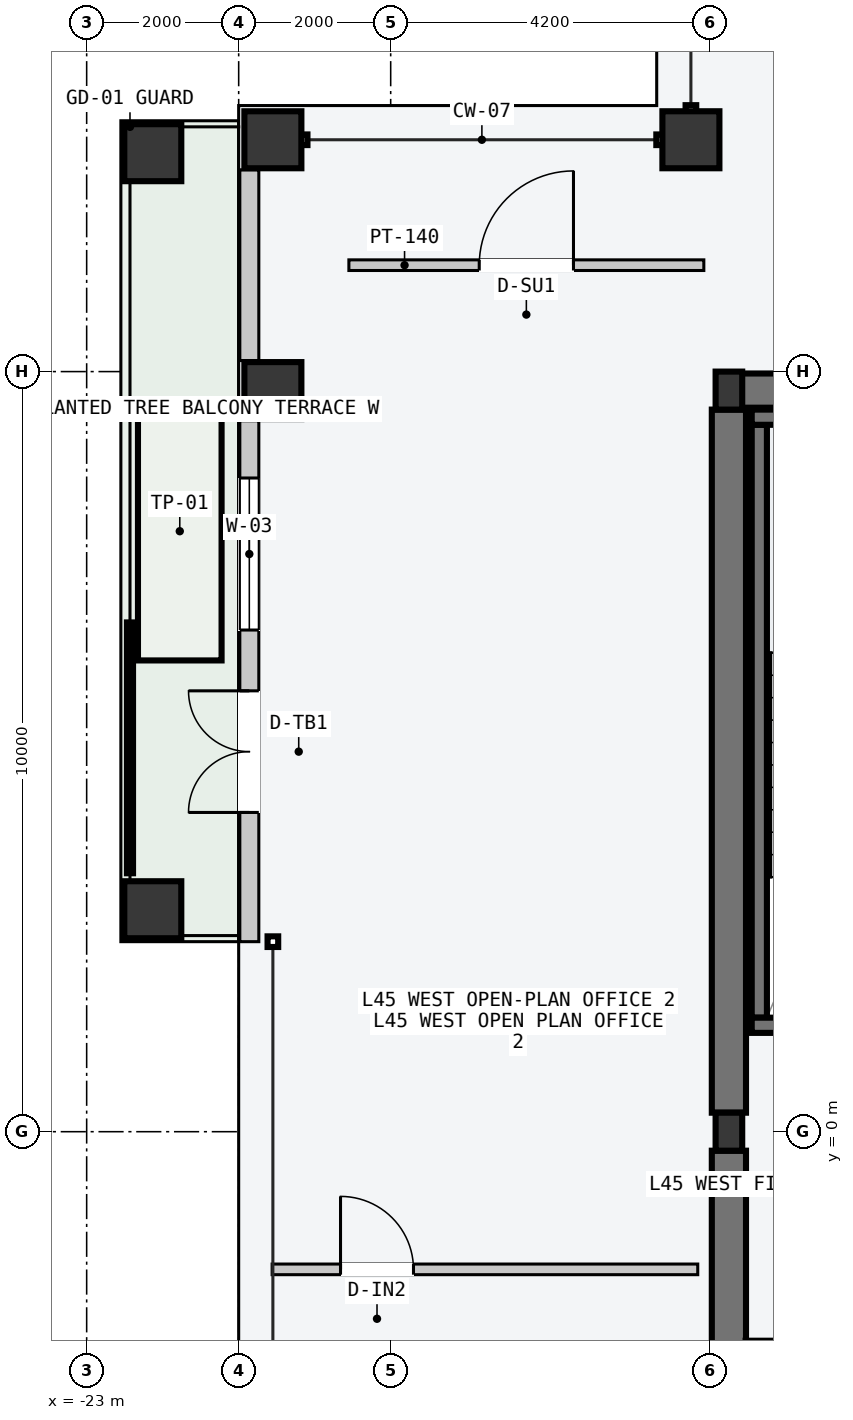
"""IFC4 building model, lengths in metres.
Left out: names, types, materials, properties, quantities, classifications, styles, units other than length and angle.
Written with IfcOpenShell. Run it as: python <this file> out.ifc"""

import sys

from ifc_helpers import new_model, si_unit, direction, frame, frame_2d, origin, origin_2d, place, context, subcontext, project, spatial, rectangle, hollow_rectangle, i_section, extrude, element, fill, save


model = new_model("IFC4")
c1 = context("Model", 3, precision=1e-05, world=origin(), true_north=direction((0.0, 1.0)))
c2 = subcontext(c1, "Body", "Model", "MODEL_VIEW")
j1 = project(units=[si_unit("LENGTHUNIT", "METRE"), si_unit("PLANEANGLEUNIT", "RADIAN")], contexts=[c1])
p1 = place(None, origin())
s1 = spatial("IfcSite", under=j1, at=p1, CompositionType="ELEMENT")
p2 = place(p1, origin())
s2 = spatial("IfcBuilding", under=s1, at=p2, CompositionType="ELEMENT")
p3 = place(p2, frame((0.0, 0.0, 173.1)))
s3 = spatial("IfcBuildingStorey", under=s2, at=p3, CompositionType="ELEMENT", Elevation=173.1)
p4 = place(p3, frame((-14.53, 9.75, -0.2), z_axis=(0.0, 0.0, 1.0), x_axis=(1.0, 0.0, 0.0)))
e1 = element("IfcWall", 1, at=p4, inside=s3, PredefinedType="SHEAR", context=c2, shape_type="SweptSolid", body=[
    extrude(rectangle(XDim=6.46, YDim=0.45, at=frame_2d((3.23, 0.0))), origin(), (0.0, 0.0, 1.0), 3.6),
])
for number, where, z_axis, x_axis in (
    (2, (-14.55, -9.5, -0.2), (0.0, 0.0, 1.0), (0.0, 1.0, 0.0)),
    (3, (-14.55, 0.25, -0.2), (0.0, 0.0, 1.0), (0.0, 1.0, 0.0)),
):
    element("IfcWall", number, at=place(p3, frame(where, z_axis=z_axis, x_axis=x_axis)), inside=s3, PredefinedType="SHEAR", context=c2, shape_type="SweptSolid", body=[
        extrude(rectangle(XDim=9.25, YDim=0.45, at=frame_2d((4.625, 0.0))), origin(), (0.0, 0.0, 1.0), 3.6),
    ])
p5 = place(p3, frame((-14.15, 1.5, -0.2), z_axis=(0.0, 0.0, 1.0), x_axis=(0.0, 1.0, 0.0)))
e4 = element("IfcWall", 4, at=p5, inside=s3, PredefinedType="SOLIDWALL", context=c2, shape_type="SweptSolid", body=[
    extrude(rectangle(XDim=7.8, YDim=0.2, at=frame_2d((3.9, 0.0))), origin(), (0.0, 0.0, 1.0), 3.6),
])
p6 = place(p3, frame((-14.25, 1.4, -0.2), z_axis=(0.0, 0.0, 1.0), x_axis=(1.0, 0.0, 0.0)))
e5 = element("IfcWall", 5, at=p6, inside=s3, PredefinedType="SOLIDWALL", context=c2, shape_type="SweptSolid", body=[
    extrude(rectangle(XDim=3.72, YDim=0.2, at=frame_2d((1.86, 0.0))), origin(), (0.0, 0.0, 1.0), 3.6),
])
p7 = place(p6, frame((1.5, 0.0, 0.2)))
e6 = element("IfcOpeningElement", 6, at=p7, cuts=e5, PredefinedType="OPENING", context=c2, shape_type="SweptSolid", body=[
    extrude(rectangle(XDim=1.12, YDim=2.18, at=frame_2d((0.56, 1.09))), frame((0.0, 0.11, 0.0), z_axis=(0.0, -1.0, 0.0), x_axis=(1.0, 0.0, 0.0)), (0.0, 0.0, 1.0), 0.22),
])
p8 = place(p3, frame((-14.25, 9.4, -0.2), z_axis=(0.0, 0.0, 1.0), x_axis=(1.0, 0.0, 0.0)))
e7 = element("IfcWall", 7, at=p8, inside=s3, PredefinedType="SOLIDWALL", context=c2, shape_type="SweptSolid", body=[
    extrude(rectangle(XDim=3.72, YDim=0.2, at=frame_2d((1.86, 0.0))), origin(), (0.0, 0.0, 1.0), 3.6),
])
for number, where, z_axis, x_axis in (
    (8, (-14.55, 0.0, 0.0), (0.0, 0.0, 1.0), (1.0, 0.0, 0.0)),
    (9, (-14.55, 9.75, 0.0), (0.0, 0.0, 1.0), (1.0, 0.0, 0.0)),
):
    element("IfcColumn", number, at=place(p3, frame(where, z_axis=z_axis, x_axis=x_axis)), inside=s3, PredefinedType="COLUMN", context=c2, shape_type="SweptSolid", body=[
        extrude(i_section(OverallWidth=0.35, OverallDepth=0.5, WebThickness=0.02, FlangeThickness=0.032, at=origin_2d()), origin(), (0.0, 0.0, 1.0), 3.6),
    ])
for number, where, z_axis, x_axis in (
    (10, (-20.55, 9.75, 0.0), (0.0, 0.0, 1.0), (0.0, 1.0, 0.0)),
    (11, (-20.55, 13.05, 0.0), (0.0, 0.0, 1.0), (0.0, 1.0, 0.0)),
    (12, (-15.05, 13.05, 0.0), (0.0, 0.0, 1.0), (1.0, 0.0, 0.0)),
    (13, (-22.13, 2.92, 0.0), (0.0, 0.0, 1.0), (0.0, 1.0, 0.0)),
    (14, (-22.13, 12.88, 0.0), (0.0, 0.0, 1.0), (0.0, 1.0, 0.0)),
):
    element("IfcColumn", number, at=place(p3, frame(where, z_axis=z_axis, x_axis=x_axis)), inside=s3, PredefinedType="COLUMN", context=c2, shape_type="SweptSolid", body=[
        extrude(hollow_rectangle(XDim=0.75, YDim=0.75, WallThickness=0.032, at=origin_2d()), origin(), (0.0, 0.0, 1.0), 3.6),
    ])
p9 = place(p3, frame((-20.86, 2.5, 0.0), z_axis=(0.0, 0.0, 1.0), x_axis=(0.0, 1.0, 0.0)))
e15 = element("IfcWall", 15, at=p9, inside=s3, PredefinedType="STANDARD", context=c2, shape_type="SweptSolid", body=[
    extrude(rectangle(XDim=6.855, YDim=0.25, at=frame_2d((3.427, 0.0))), origin(), (0.0, 0.0, 1.0), 3.4),
])
p10 = place(p9, frame((1.7, 0.0, 0.0)))
e16 = element("IfcOpeningElement", 16, at=p10, cuts=e15, PredefinedType="OPENING", context=c2, shape_type="SweptSolid", body=[
    extrude(rectangle(XDim=1.6, YDim=2.2, at=frame_2d((0.8, 1.1))), frame((0.0, 0.135, 0.0), z_axis=(0.0, -1.0, 0.0), x_axis=(1.0, 0.0, 0.0)), (0.0, 0.0, 1.0), 0.27),
])
p11 = place(p9, frame((4.1, 0.0, 0.85)))
e17 = element("IfcOpeningElement", 17, at=p11, cuts=e15, PredefinedType="OPENING", context=c2, shape_type="SweptSolid", body=[
    extrude(rectangle(XDim=2.0, YDim=2.1, at=frame_2d((1.0, 1.05))), frame((0.0, 0.135, 0.0), z_axis=(0.0, -1.0, 0.0), x_axis=(1.0, 0.0, 0.0)), (0.0, 0.0, 1.0), 0.27),
])
p12 = place(p3, frame((-20.86, 10.145, 0.0), z_axis=(0.0, 0.0, 1.0), x_axis=(0.0, 1.0, 0.0)))
e18 = element("IfcWall", 18, at=p12, inside=s3, PredefinedType="STANDARD", context=c2, shape_type="SweptSolid", body=[
    extrude(rectangle(XDim=2.51, YDim=0.25, at=frame_2d((1.255, 0.0))), origin(), (0.0, 0.0, 1.0), 3.4),
])
p13 = place(p3, frame((-14.33, -2.845, -0.2), z_axis=(0.0, 0.0, 1.0), x_axis=(1.0, 0.0, 0.0)))
e19 = element("IfcWall", 19, at=p13, inside=s3, PredefinedType="SOLIDWALL", context=c2, shape_type="SweptSolid", body=[
    extrude(rectangle(XDim=2.68, YDim=0.19, at=frame_2d((1.34, 0.0))), origin(), (0.0, 0.0, 1.0), 3.6),
])
p14 = place(p13, frame((0.83, 0.0, 0.2)))
e20 = element("IfcOpeningElement", 20, at=p14, cuts=e19, PredefinedType="OPENING", context=c2, shape_type="SweptSolid", body=[
    extrude(rectangle(XDim=1.2, YDim=2.2, at=frame_2d((0.6, 1.1))), frame((0.0, 0.105, 0.0), z_axis=(0.0, -1.0, 0.0), x_axis=(1.0, 0.0, 0.0)), (0.0, 0.0, 1.0), 0.21),
])
p15 = place(p3, frame((-19.55, 11.4, 0.0), z_axis=(0.0, 0.0, 1.0), x_axis=(1.0, 0.0, 0.0)))
e21 = element("IfcWall", 21, at=p15, inside=s3, PredefinedType="PARTITIONING", context=c2, shape_type="SweptSolid", body=[
    extrude(rectangle(XDim=4.67, YDim=0.14, at=frame_2d((2.335, 0.0))), origin(), (0.0, 0.0, 1.0), 3.4),
])
p16 = place(p15, frame((1.715, 0.0, 0.0)))
e22 = element("IfcOpeningElement", 22, at=p16, cuts=e21, PredefinedType="OPENING", context=c2, shape_type="SweptSolid", body=[
    extrude(rectangle(XDim=1.24, YDim=2.24, at=frame_2d((0.62, 1.12))), frame((0.0, 0.08, 0.0), z_axis=(0.0, -1.0, 0.0), x_axis=(1.0, 0.0, 0.0)), (0.0, 0.0, 1.0), 0.16),
])
p17 = place(p3, frame((-20.56, -1.811, 0.0), z_axis=(0.0, 0.0, 1.0), x_axis=(1.0, 0.0, 0.0)))
e23 = element("IfcWall", 23, at=p17, inside=s3, PredefinedType="PARTITIONING", context=c2, shape_type="SweptSolid", body=[
    extrude(rectangle(XDim=5.6, YDim=0.14, at=frame_2d((2.8, 0.0))), origin(), (0.0, 0.0, 1.0), 3.4),
])
p18 = place(p17, frame((0.9, 0.0, 0.0)))
e24 = element("IfcOpeningElement", 24, at=p18, cuts=e23, PredefinedType="OPENING", context=c2, shape_type="SweptSolid", body=[
    extrude(rectangle(XDim=0.96, YDim=2.18, at=frame_2d((0.48, 1.09))), frame((0.0, 0.08, 0.0), z_axis=(0.0, -1.0, 0.0), x_axis=(1.0, 0.0, 0.0)), (0.0, 0.0, 1.0), 0.16),
])
p19 = place(p10, origin())
e25 = element("IfcDoor", 25, at=p19, inside=s3, OperationType="DOUBLE_DOOR_SINGLE_SWING", PredefinedType="DOOR", context=c2, shape_type="SweptSolid", body=[
    extrude(rectangle(XDim=1.6, YDim=2.2, at=frame_2d((0.8, 1.1))), frame((0.0, 0.025, 0.0), z_axis=(0.0, -1.0, 0.0), x_axis=(1.0, 0.0, 0.0)), (0.0, 0.0, 1.0), 0.05),
])
fill(e16, e25)
p20 = place(p11, origin())
e26 = element("IfcWindow", 26, at=p20, inside=s3, PartitioningType="SINGLE_PANEL", PredefinedType="WINDOW", context=c2, shape_type="SweptSolid", body=[
    extrude(rectangle(XDim=2.0, YDim=2.1, at=frame_2d((1.0, 1.05))), frame((0.0, 0.03, 0.0), z_axis=(0.0, -1.0, 0.0), x_axis=(1.0, 0.0, 0.0)), (0.0, 0.0, 1.0), 0.06),
])
fill(e17, e26)
p21 = place(p16, origin())
e27 = element("IfcDoor", 27, at=p21, inside=s3, OperationType="SINGLE_SWING_RIGHT", PredefinedType="DOOR", context=c2, shape_type="SweptSolid", body=[
    extrude(rectangle(XDim=1.24, YDim=2.24, at=frame_2d((0.62, 1.12))), frame((0.0, 0.025, 0.0), z_axis=(0.0, -1.0, 0.0), x_axis=(1.0, 0.0, 0.0)), (0.0, 0.0, 1.0), 0.05),
])
fill(e22, e27)
p22 = place(p18, origin())
e28 = element("IfcDoor", 28, at=p22, inside=s3, OperationType="SINGLE_SWING_LEFT", PredefinedType="DOOR", context=c2, shape_type="SweptSolid", body=[
    extrude(rectangle(XDim=0.96, YDim=2.18, at=frame_2d((0.48, 1.09))), frame((0.0, 0.025, 0.0), z_axis=(0.0, -1.0, 0.0), x_axis=(1.0, 0.0, 0.0)), (0.0, 0.0, 1.0), 0.05),
])
fill(e24, e28)
save(model, sys.argv[1])
